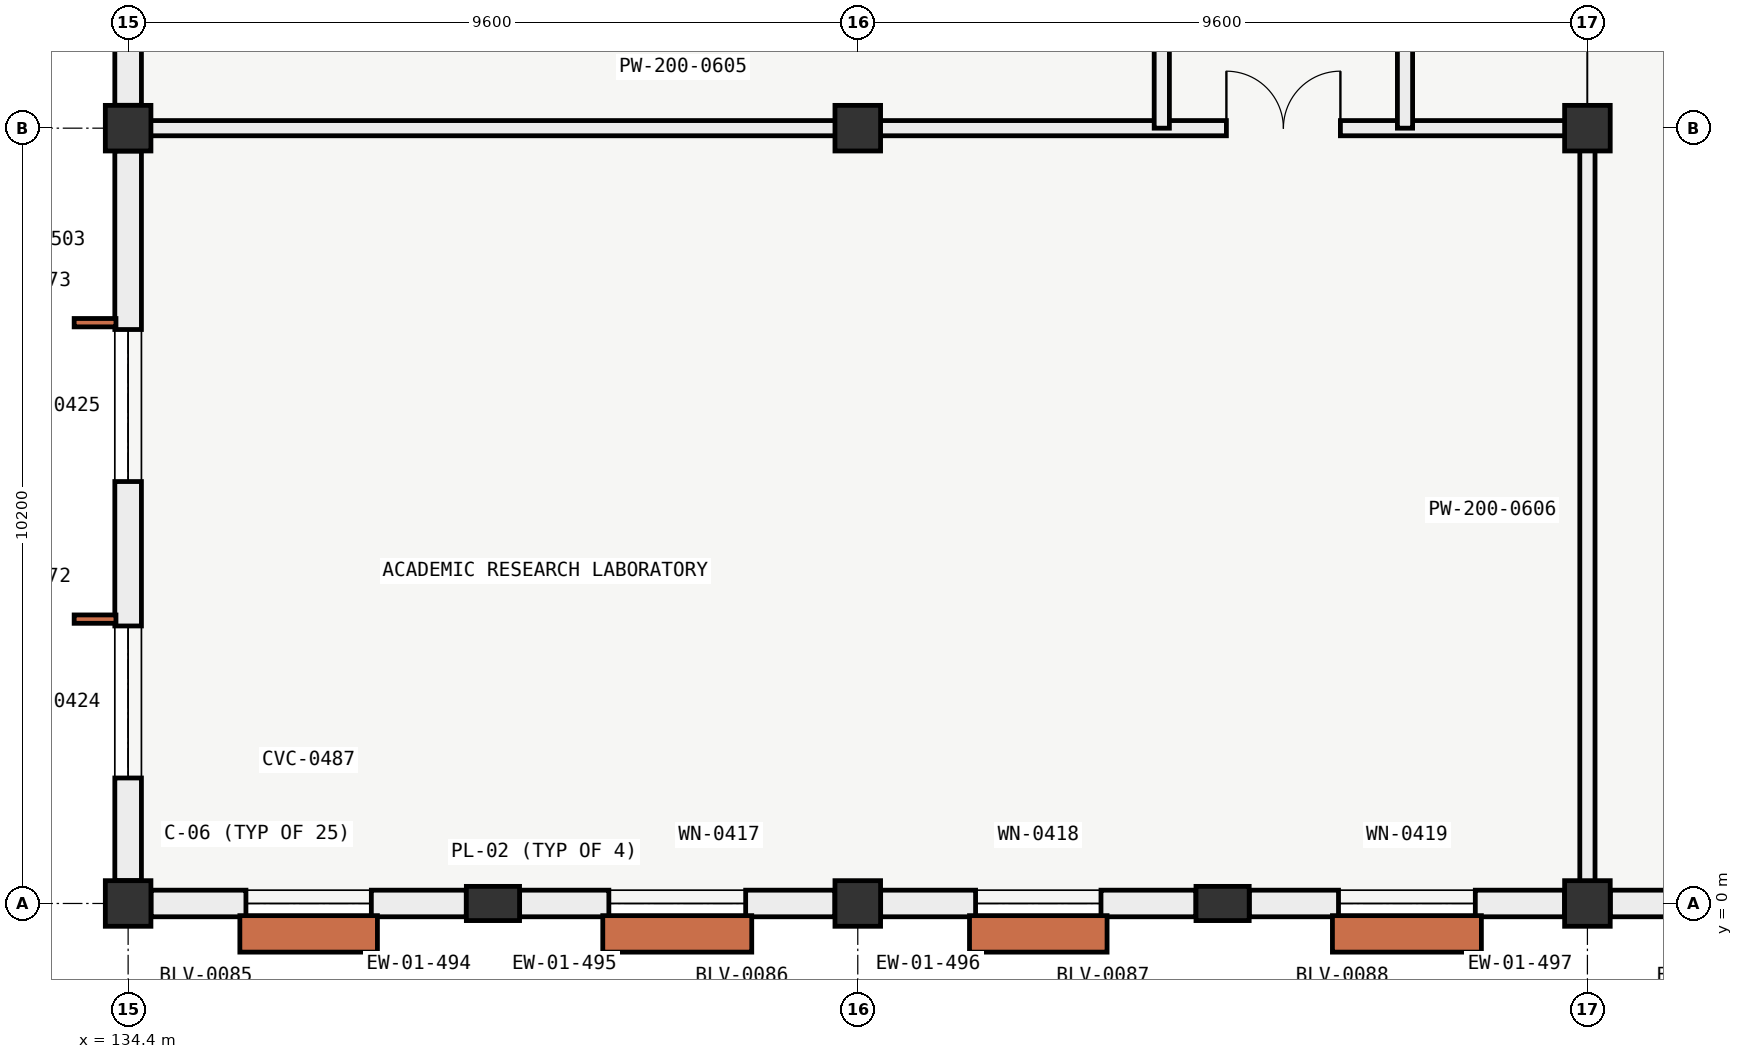
"""IFC4 building model, lengths in metres.
Left out: names, types, materials, properties, quantities, classifications, styles, units other than length and angle.
Written with IfcOpenShell. Run it as: python <this file> out.ifc"""

import sys

from ifc_helpers import new_model, si_unit, direction, frame, frame_2d, origin, origin_2d, place, context, subcontext, project, spatial, rectangle, extrude, element, fill, save


model = new_model("IFC4")
c1 = context("Model", 3, precision=1e-05, world=origin(), true_north=direction((0.0, 1.0)))
c2 = subcontext(c1, "Body", "Model", "MODEL_VIEW")
j1 = project(units=[si_unit("LENGTHUNIT", "METRE"), si_unit("PLANEANGLEUNIT", "RADIAN")], contexts=[c1])
p1 = place(None, origin())
s1 = spatial("IfcSite", under=j1, at=p1, CompositionType="ELEMENT")
p2 = place(p1, origin())
s2 = spatial("IfcBuilding", under=s1, at=p2, CompositionType="ELEMENT")
p3 = place(p2, frame((0.0, 0.0, 18.0)))
s3 = spatial("IfcBuildingStorey", under=s2, at=p3, CompositionType="ELEMENT", Elevation=18.0)
for number, where, z_axis, x_axis in (
    (1, (134.4, 0.0, 0.0), (0.0, 0.0, 1.0), (1.0, 0.0, 0.0)),
    (2, (134.4, 10.2, 0.0), (0.0, 0.0, 1.0), (1.0, 0.0, 0.0)),
    (3, (144.0, 0.0, 0.0), (0.0, 0.0, 1.0), (1.0, 0.0, 0.0)),
    (4, (144.0, 10.2, 0.0), (0.0, 0.0, 1.0), (1.0, 0.0, 0.0)),
    (5, (153.6, 0.0, 0.0), (0.0, 0.0, 1.0), (1.0, 0.0, 0.0)),
    (6, (153.6, 10.2, 0.0), (0.0, 0.0, 1.0), (1.0, 0.0, 0.0)),
):
    element("IfcColumn", number, at=place(p3, frame(where, z_axis=z_axis, x_axis=x_axis)), inside=s3, PredefinedType="COLUMN", context=c2, shape_type="SweptSolid", body=[
        extrude(rectangle(XDim=0.6, YDim=0.6, at=origin_2d()), origin(), (0.0, 0.0, 1.0), 4.2),
    ])
for number, where, z_axis, x_axis in (
    (7, (139.2, 0.0, 0.0), (0.0, 0.0, 1.0), (0.0, 1.0, 0.0)),
    (8, (148.8, 0.0, 0.0), (0.0, 0.0, 1.0), (0.0, 1.0, 0.0)),
):
    element("IfcColumn", number, at=place(p3, frame(where, z_axis=z_axis, x_axis=x_axis)), inside=s3, PredefinedType="PILASTER", context=c2, shape_type="SweptSolid", body=[
        extrude(rectangle(XDim=0.45, YDim=0.7, at=origin_2d()), origin(), (0.0, 0.0, 1.0), 4.2),
    ])
p4 = place(p3, frame((138.849, 0.0, 0.0), z_axis=(0.0, 0.0, 1.0), x_axis=(-1.0, 0.0, 0.0)))
e9 = element("IfcWall", 9, at=p4, inside=s3, PredefinedType="SOLIDWALL", context=c2, shape_type="SweptSolid", body=[
    extrude(rectangle(XDim=4.148, YDim=0.35, at=frame_2d((2.074, 0.0))), origin(), (0.0, 0.0, 1.0), 3.3),
])
p5 = place(p4, frame((1.249, 0.0, 0.85)))
e10 = element("IfcOpeningElement", 10, at=p5, cuts=e9, PredefinedType="OPENING", context=c2, shape_type="SweptSolid", body=[
    extrude(rectangle(XDim=1.65, YDim=2.0, at=frame_2d((0.825, 1.0))), frame((0.0, 0.185, 0.0), z_axis=(0.0, -1.0, 0.0), x_axis=(1.0, 0.0, 0.0)), (0.0, 0.0, 1.0), 0.37),
])
p6 = place(p3, frame((143.699, 0.0, 0.0), z_axis=(0.0, 0.0, 1.0), x_axis=(-1.0, 0.0, 0.0)))
e11 = element("IfcWall", 11, at=p6, inside=s3, PredefinedType="SOLIDWALL", context=c2, shape_type="SweptSolid", body=[
    extrude(rectangle(XDim=4.148, YDim=0.35, at=frame_2d((2.074, 0.0))), origin(), (0.0, 0.0, 1.0), 3.3),
])
p7 = place(p6, frame((1.174, 0.0, 0.85)))
e12 = element("IfcOpeningElement", 12, at=p7, cuts=e11, PredefinedType="OPENING", context=c2, shape_type="SweptSolid", body=[
    extrude(rectangle(XDim=1.8, YDim=2.1, at=frame_2d((0.9, 1.05))), frame((0.0, 0.185, 0.0), z_axis=(0.0, -1.0, 0.0), x_axis=(1.0, 0.0, 0.0)), (0.0, 0.0, 1.0), 0.37),
])
p8 = place(p3, frame((148.449, 0.0, 0.0), z_axis=(0.0, 0.0, 1.0), x_axis=(-1.0, 0.0, 0.0)))
e13 = element("IfcWall", 13, at=p8, inside=s3, PredefinedType="SOLIDWALL", context=c2, shape_type="SweptSolid", body=[
    extrude(rectangle(XDim=4.148, YDim=0.35, at=frame_2d((2.074, 0.0))), origin(), (0.0, 0.0, 1.0), 3.3),
])
p9 = place(p8, frame((1.249, 0.0, 0.85)))
e14 = element("IfcOpeningElement", 14, at=p9, cuts=e13, PredefinedType="OPENING", context=c2, shape_type="SweptSolid", body=[
    extrude(rectangle(XDim=1.65, YDim=2.0, at=frame_2d((0.825, 1.0))), frame((0.0, 0.185, 0.0), z_axis=(0.0, -1.0, 0.0), x_axis=(1.0, 0.0, 0.0)), (0.0, 0.0, 1.0), 0.37),
])
p10 = place(p3, frame((153.299, 0.0, 0.0), z_axis=(0.0, 0.0, 1.0), x_axis=(-1.0, 0.0, 0.0)))
e15 = element("IfcWall", 15, at=p10, inside=s3, PredefinedType="SOLIDWALL", context=c2, shape_type="SweptSolid", body=[
    extrude(rectangle(XDim=4.148, YDim=0.35, at=frame_2d((2.074, 0.0))), origin(), (0.0, 0.0, 1.0), 3.3),
])
p11 = place(p10, frame((1.174, 0.0, 0.85)))
e16 = element("IfcOpeningElement", 16, at=p11, cuts=e15, PredefinedType="OPENING", context=c2, shape_type="SweptSolid", body=[
    extrude(rectangle(XDim=1.8, YDim=2.1, at=frame_2d((0.9, 1.05))), frame((0.0, 0.185, 0.0), z_axis=(0.0, -1.0, 0.0), x_axis=(1.0, 0.0, 0.0)), (0.0, 0.0, 1.0), 0.37),
])
p12 = place(p3, frame((158.049, 0.0, 0.0), z_axis=(0.0, 0.0, 1.0), x_axis=(-1.0, 0.0, 0.0)))
e17 = element("IfcWall", 17, at=p12, inside=s3, PredefinedType="SOLIDWALL", context=c2, shape_type="SweptSolid", body=[
    extrude(rectangle(XDim=4.148, YDim=0.35, at=frame_2d((2.074, 0.0))), origin(), (0.0, 0.0, 1.0), 3.3),
])
p13 = place(p12, frame((1.249, 0.0, 0.85)))
e18 = element("IfcOpeningElement", 18, at=p13, cuts=e17, PredefinedType="OPENING", context=c2, shape_type="SweptSolid", body=[
    extrude(rectangle(XDim=1.65, YDim=2.0, at=frame_2d((0.825, 1.0))), frame((0.0, 0.185, 0.0), z_axis=(0.0, -1.0, 0.0), x_axis=(1.0, 0.0, 0.0)), (0.0, 0.0, 1.0), 0.37),
])
p14 = place(p3, frame((134.4, 0.301, 0.0), z_axis=(0.0, 0.0, 1.0), x_axis=(0.0, 1.0, 0.0)))
e19 = element("IfcWall", 19, at=p14, inside=s3, PredefinedType="SOLIDWALL", context=c2, shape_type="SweptSolid", body=[
    extrude(rectangle(XDim=9.598, YDim=0.35, at=frame_2d((4.799, 0.0))), origin(), (0.0, 0.0, 1.0), 3.3),
])
p15 = place(p14, frame((1.35, 0.0, 0.85)))
e20 = element("IfcOpeningElement", 20, at=p15, cuts=e19, PredefinedType="OPENING", context=c2, shape_type="SweptSolid", body=[
    extrude(rectangle(XDim=2.0, YDim=1.35, at=frame_2d((1.0, 0.675))), frame((0.0, 0.185, 0.0), z_axis=(0.0, -1.0, 0.0), x_axis=(1.0, 0.0, 0.0)), (0.0, 0.0, 1.0), 0.37),
])
p16 = place(p14, frame((5.25, 0.0, 0.85)))
e21 = element("IfcOpeningElement", 21, at=p16, cuts=e19, PredefinedType="OPENING", context=c2, shape_type="SweptSolid", body=[
    extrude(rectangle(XDim=2.0, YDim=1.35, at=frame_2d((1.0, 0.675))), frame((0.0, 0.185, 0.0), z_axis=(0.0, -1.0, 0.0), x_axis=(1.0, 0.0, 0.0)), (0.0, 0.0, 1.0), 0.37),
])
p17 = place(p3, frame((134.4, 10.501, 0.0), z_axis=(0.0, 0.0, 1.0), x_axis=(0.0, 1.0, 0.0)))
e22 = element("IfcWall", 22, at=p17, inside=s3, PredefinedType="SOLIDWALL", context=c2, shape_type="SweptSolid", body=[
    extrude(rectangle(XDim=9.598, YDim=0.35, at=frame_2d((4.799, 0.0))), origin(), (0.0, 0.0, 1.0), 3.3),
])
p18 = place(p17, frame((1.35, 0.0, 0.85)))
e23 = element("IfcOpeningElement", 23, at=p18, cuts=e22, PredefinedType="OPENING", context=c2, shape_type="SweptSolid", body=[
    extrude(rectangle(XDim=2.0, YDim=1.35, at=frame_2d((1.0, 0.675))), frame((0.0, 0.185, 0.0), z_axis=(0.0, -1.0, 0.0), x_axis=(1.0, 0.0, 0.0)), (0.0, 0.0, 1.0), 0.37),
])
p19 = place(p17, frame((5.619, 0.0, 0.85)))
e24 = element("IfcOpeningElement", 24, at=p19, cuts=e22, PredefinedType="OPENING", context=c2, shape_type="SweptSolid", body=[
    extrude(rectangle(XDim=2.0, YDim=1.35, at=frame_2d((1.0, 0.675))), frame((0.0, 0.185, 0.0), z_axis=(0.0, -1.0, 0.0), x_axis=(1.0, 0.0, 0.0)), (0.0, 0.0, 1.0), 0.37),
])
p20 = place(p3, frame((134.55, 10.2, 0.0), z_axis=(0.0, 0.0, 1.0), x_axis=(1.0, 0.0, 0.0)))
e25 = element("IfcWall", 25, at=p20, inside=s3, PredefinedType="PARTITIONING", context=c2, shape_type="SweptSolid", body=[
    extrude(rectangle(XDim=19.05, YDim=0.2, at=frame_2d((9.525, 0.0))), origin(), (0.0, 0.0, 1.0), 3.85),
])
p21 = place(p20, frame((14.3, 0.0, 0.0)))
e26 = element("IfcOpeningElement", 26, at=p21, cuts=e25, PredefinedType="OPENING", context=c2, shape_type="SweptSolid", body=[
    extrude(rectangle(XDim=1.5, YDim=2.2, at=frame_2d((0.75, 1.1))), frame((0.0, 0.11, 0.0), z_axis=(0.0, -1.0, 0.0), x_axis=(1.0, 0.0, 0.0)), (0.0, 0.0, 1.0), 0.22),
])
p22 = place(p3, frame((153.6, 0.15, 0.0), z_axis=(0.0, 0.0, 1.0), x_axis=(0.0, 1.0, 0.0)))
e27 = element("IfcWall", 27, at=p22, inside=s3, PredefinedType="PARTITIONING", context=c2, shape_type="SweptSolid", body=[
    extrude(rectangle(XDim=10.05, YDim=0.2, at=frame_2d((5.025, 0.0))), origin(), (0.0, 0.0, 1.0), 3.85),
])
p23 = place(p3, frame((148.0, 10.2, 0.0), z_axis=(0.0, 0.0, 1.0), x_axis=(0.0, 1.0, 0.0)))
e28 = element("IfcWall", 28, at=p23, inside=s3, PredefinedType="PARTITIONING", context=c2, shape_type="SweptSolid", body=[
    extrude(rectangle(XDim=14.0, YDim=0.2, at=frame_2d((7.0, 0.0))), origin(), (0.0, 0.0, 1.0), 3.641),
])
p24 = place(p23, frame((3.2, 0.0, 0.0)))
e29 = element("IfcOpeningElement", 29, at=p24, cuts=e28, PredefinedType="OPENING", context=c2, shape_type="SweptSolid", body=[
    extrude(rectangle(XDim=0.98, YDim=2.15, at=frame_2d((0.49, 1.075))), frame((0.0, 0.11, 0.0), z_axis=(0.0, -1.0, 0.0), x_axis=(1.0, 0.0, 0.0)), (0.0, 0.0, 1.0), 0.22),
])
p25 = place(p23, frame((10.8, 0.0, 0.0)))
e30 = element("IfcOpeningElement", 30, at=p25, cuts=e28, PredefinedType="OPENING", context=c2, shape_type="SweptSolid", body=[
    extrude(rectangle(XDim=1.5, YDim=2.2, at=frame_2d((0.75, 1.1))), frame((0.0, 0.11, 0.0), z_axis=(0.0, -1.0, 0.0), x_axis=(1.0, 0.0, 0.0)), (0.0, 0.0, 1.0), 0.22),
])
p26 = place(p3, frame((151.2, 10.2, 0.0), z_axis=(0.0, 0.0, 1.0), x_axis=(0.0, 1.0, 0.0)))
e31 = element("IfcWall", 31, at=p26, inside=s3, PredefinedType="PARTITIONING", context=c2, shape_type="SweptSolid", body=[
    extrude(rectangle(XDim=14.0, YDim=0.2, at=frame_2d((7.0, 0.0))), origin(), (0.0, 0.0, 1.0), 3.641),
])
p27 = place(p26, frame((6.8, 0.0, 0.0)))
e32 = element("IfcOpeningElement", 32, at=p27, cuts=e31, PredefinedType="OPENING", context=c2, shape_type="SweptSolid", body=[
    extrude(rectangle(XDim=0.98, YDim=2.15, at=frame_2d((0.49, 1.075))), frame((0.0, 0.11, 0.0), z_axis=(0.0, -1.0, 0.0), x_axis=(1.0, 0.0, 0.0)), (0.0, 0.0, 1.0), 0.22),
])
p28 = place(p5, origin())
e33 = element("IfcWindow", 33, at=p28, inside=s3, PartitioningType="SINGLE_PANEL", PredefinedType="WINDOW", context=c2, shape_type="SweptSolid", body=[
    extrude(rectangle(XDim=1.65, YDim=2.0, at=frame_2d((0.825, 1.0))), frame((0.0, 0.03, 0.0), z_axis=(0.0, -1.0, 0.0), x_axis=(1.0, 0.0, 0.0)), (0.0, 0.0, 1.0), 0.06),
])
fill(e10, e33)
p29 = place(p7, origin())
e34 = element("IfcWindow", 34, at=p29, inside=s3, PartitioningType="SINGLE_PANEL", PredefinedType="WINDOW", context=c2, shape_type="SweptSolid", body=[
    extrude(rectangle(XDim=1.8, YDim=2.1, at=frame_2d((0.9, 1.05))), frame((0.0, 0.03, 0.0), z_axis=(0.0, -1.0, 0.0), x_axis=(1.0, 0.0, 0.0)), (0.0, 0.0, 1.0), 0.06),
])
fill(e12, e34)
p30 = place(p9, origin())
e35 = element("IfcWindow", 35, at=p30, inside=s3, PartitioningType="SINGLE_PANEL", PredefinedType="WINDOW", context=c2, shape_type="SweptSolid", body=[
    extrude(rectangle(XDim=1.65, YDim=2.0, at=frame_2d((0.825, 1.0))), frame((0.0, 0.03, 0.0), z_axis=(0.0, -1.0, 0.0), x_axis=(1.0, 0.0, 0.0)), (0.0, 0.0, 1.0), 0.06),
])
fill(e14, e35)
p31 = place(p11, origin())
e36 = element("IfcWindow", 36, at=p31, inside=s3, PartitioningType="SINGLE_PANEL", PredefinedType="WINDOW", context=c2, shape_type="SweptSolid", body=[
    extrude(rectangle(XDim=1.8, YDim=2.1, at=frame_2d((0.9, 1.05))), frame((0.0, 0.03, 0.0), z_axis=(0.0, -1.0, 0.0), x_axis=(1.0, 0.0, 0.0)), (0.0, 0.0, 1.0), 0.06),
])
fill(e16, e36)
p32 = place(p15, origin())
e37 = element("IfcWindow", 37, at=p32, inside=s3, PartitioningType="SINGLE_PANEL", PredefinedType="WINDOW", context=c2, shape_type="SweptSolid", body=[
    extrude(rectangle(XDim=2.0, YDim=1.35, at=frame_2d((1.0, 0.675))), frame((0.0, 0.03, 0.0), z_axis=(0.0, -1.0, 0.0), x_axis=(1.0, 0.0, 0.0)), (0.0, 0.0, 1.0), 0.06),
])
fill(e20, e37)
p33 = place(p16, origin())
e38 = element("IfcWindow", 38, at=p33, inside=s3, PartitioningType="SINGLE_PANEL", PredefinedType="WINDOW", context=c2, shape_type="SweptSolid", body=[
    extrude(rectangle(XDim=2.0, YDim=1.35, at=frame_2d((1.0, 0.675))), frame((0.0, 0.03, 0.0), z_axis=(0.0, -1.0, 0.0), x_axis=(1.0, 0.0, 0.0)), (0.0, 0.0, 1.0), 0.06),
])
fill(e21, e38)
p34 = place(p21, origin())
e39 = element("IfcDoor", 39, at=p34, inside=s3, OperationType="DOUBLE_DOOR_SINGLE_SWING", PredefinedType="DOOR", context=c2, shape_type="SweptSolid", body=[
    extrude(rectangle(XDim=1.5, YDim=2.2, at=frame_2d((0.75, 1.1))), frame((0.0, 0.025, 0.0), z_axis=(0.0, -1.0, 0.0), x_axis=(1.0, 0.0, 0.0)), (0.0, 0.0, 1.0), 0.05),
])
fill(e26, e39)
save(model, sys.argv[1])
